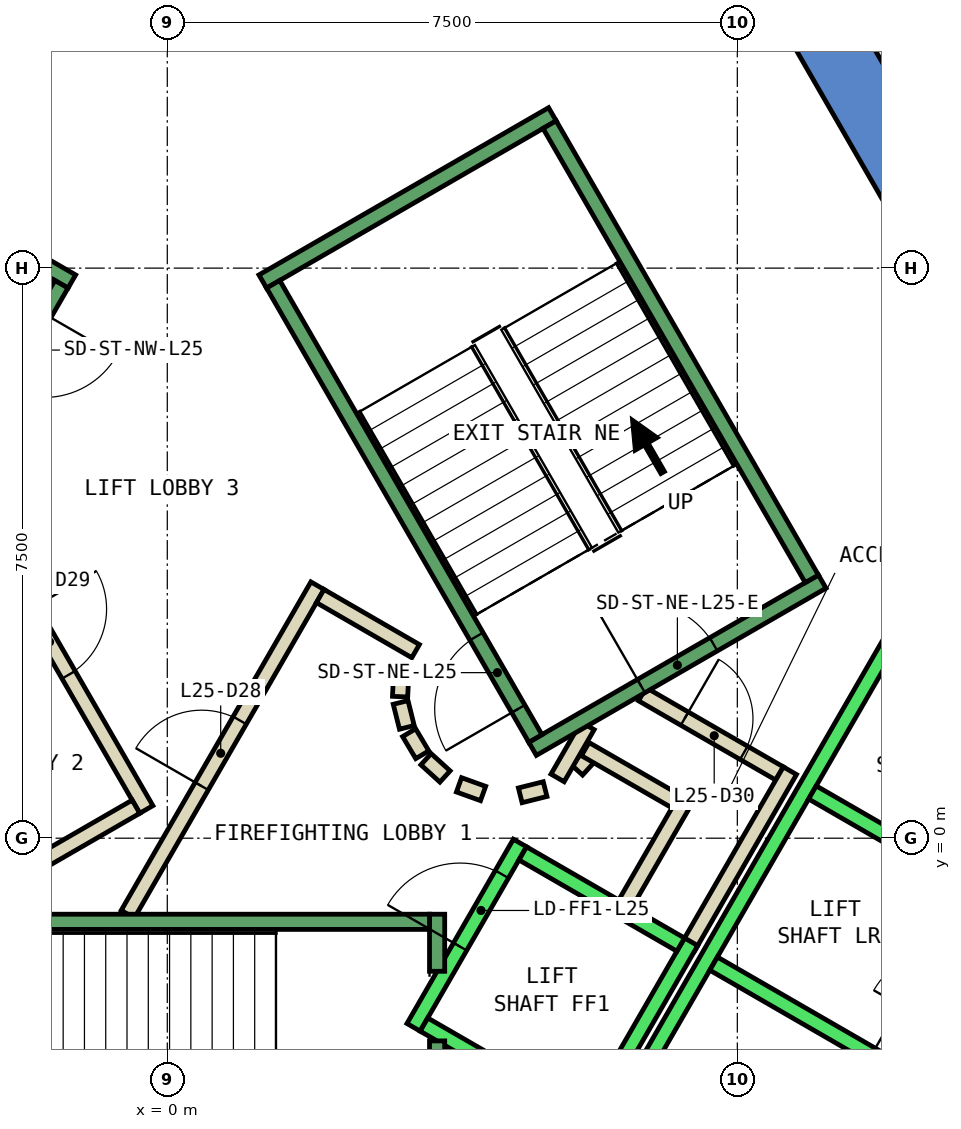
"""IFC4 building model, lengths in metres.
Left out: names, types, materials, properties, quantities, classifications, styles, units other than length and angle.
Written with IfcOpenShell. Run it as: python <this file> out.ifc"""

import sys

from ifc_helpers import new_model, si_unit, direction, frame, frame_2d, origin, place, context, subcontext, project, spatial, polyline, rectangle, outline, extrude, element, fill, save


model = new_model("IFC4")
c1 = context("Model", 3, precision=1e-05, world=origin(), true_north=direction((0.0, 1.0)))
c2 = subcontext(c1, "Body", "Model", "MODEL_VIEW")
j1 = project(units=[si_unit("LENGTHUNIT", "METRE"), si_unit("PLANEANGLEUNIT", "RADIAN")], contexts=[c1])
p1 = place(None, origin())
s1 = spatial("IfcSite", under=j1, at=p1, CompositionType="ELEMENT")
p2 = place(p1, origin())
s2 = spatial("IfcBuilding", under=s1, at=p2, CompositionType="ELEMENT")
p3 = place(p2, frame((0.0, 0.0, 116.0)))
s3 = spatial("IfcBuildingStorey", under=s2, at=p3, CompositionType="ELEMENT", Elevation=116.0)
p4 = place(p3, frame((0.0, 0.0, -0.4)))
e1 = element("IfcWall", 1, at=p4, inside=s3, PredefinedType="SHEAR", context=c2, shape_type="SweptSolid", body=[
    extrude(outline(polyline([(8.517, 11.748), (7.738, 11.298), (12.817, 2.5), (13.856, 2.5), (8.517, 11.748)])), origin(), (0.0, 0.0, 1.0), 4.2),
])
p5 = place(p3, frame((0.0, 0.0, -0.4)))
e2 = element("IfcWall", 2, at=p5, inside=s3, PredefinedType="SHEAR", context=c2, shape_type="SweptSolid", body=[
    extrude(outline(polyline([(10.717, -2.937), (9.938, -2.487), (9.288, -3.613), (10.067, -4.063), (10.717, -2.937)])), origin(), (0.0, 0.0, 1.0), 4.2),
])
p6 = place(p3, frame((5.39, 0.898, 0.0), z_axis=(0.0, 0.0, 1.0), x_axis=(0.673828488714, 0.738887791073, 0.0)))
e3 = element("IfcWall", 3, at=p6, inside=s3, PredefinedType="PARTITIONING", context=c2, shape_type="SweptSolid", body=[
    extrude(rectangle(XDim=0.263, YDim=0.2, at=frame_2d((0.131, 0.0))), origin(), (0.0, 0.0, 1.0), 3.8),
])
p7 = place(p3, frame((5.499, 1.172, 0.0), z_axis=(0.0, 0.0, 1.0), x_axis=(0.866333505267, -0.499465972466, 0.0)))
e4 = element("IfcWall", 4, at=p7, inside=s3, PredefinedType="PARTITIONING", context=c2, shape_type="SweptSolid", body=[
    extrude(rectangle(XDim=1.374, YDim=0.2, at=frame_2d((0.687, 0.0))), origin(), (0.0, 0.0, 1.0), 3.8),
])
p8 = place(p3, frame((6.826, 0.522, 0.0), z_axis=(0.0, 0.0, 1.0), x_axis=(-0.500016722714, -0.866015748706, 0.0)))
e5 = element("IfcWall", 5, at=p8, inside=s3, PredefinedType="PARTITIONING", context=c2, shape_type="SweptSolid", body=[
    extrude(rectangle(XDim=1.7, YDim=0.2, at=frame_2d((0.85, 0.0))), origin(), (0.0, 0.0, 1.0), 3.8),
])
p9 = place(p3, frame((6.25, 1.894, 0.0), z_axis=(0.0, 0.0, 1.0), x_axis=(0.866043184279, -0.499969202016, 0.0)))
e6 = element("IfcWall", 6, at=p9, inside=s3, PredefinedType="PARTITIONING", context=c2, shape_type="SweptSolid", body=[
    extrude(rectangle(XDim=2.084, YDim=0.2, at=frame_2d((1.042, 0.0))), origin(), (0.0, 0.0, 1.0), 3.8),
])
p10 = place(p9, frame((0.642, 0.0, 0.0)))
e7 = element("IfcOpeningElement", 7, at=p10, cuts=e6, PredefinedType="OPENING", context=c2, shape_type="SweptSolid", body=[
    extrude(rectangle(XDim=0.9, YDim=2.1, at=frame_2d((0.45, 1.05))), frame((0.0, 0.11, 0.0), z_axis=(0.0, -1.0, 0.0), x_axis=(1.0, 0.0, 0.0)), (0.0, 0.0, 1.0), 0.22),
])
p11 = place(p3, frame((8.192, 0.888, 0.0), z_axis=(0.0, 0.0, 1.0), x_axis=(-0.499940625693, -0.866059680843, 0.0)))
e8 = element("IfcWall", 8, at=p11, inside=s3, PredefinedType="PARTITIONING", context=c2, shape_type="SweptSolid", body=[
    extrude(rectangle(XDim=2.68, YDim=0.2, at=frame_2d((1.34, 0.0))), origin(), (0.0, 0.0, 1.0), 3.8),
])
p12 = place(p3, frame((5.135, 0.793, 0.0), z_axis=(0.0, 0.0, 1.0), x_axis=(0.499526442893, 0.866298639529, 0.0)))
e9 = element("IfcWall", 9, at=p12, inside=s3, PredefinedType="PARTITIONING", context=c2, shape_type="SweptSolid", body=[
    extrude(rectangle(XDim=0.791, YDim=0.2, at=frame_2d((0.396, 0.0))), origin(), (0.0, 0.0, 1.0), 3.8),
])
p13 = place(p3, frame((-0.52, -1.0, 0.0), z_axis=(0.0, 0.0, 1.0), x_axis=(0.50011622646, 0.865958290007, 0.0)))
e10 = element("IfcWall", 10, at=p13, inside=s3, PredefinedType="PARTITIONING", context=c2, shape_type="SweptSolid", body=[
    extrude(rectangle(XDim=4.991, YDim=0.2, at=frame_2d((2.496, 0.0))), origin(), (0.0, 0.0, 1.0), 3.8),
])
p14 = place(p13, frame((1.945, 0.0, 0.0)))
e11 = element("IfcOpeningElement", 11, at=p14, cuts=e10, PredefinedType="OPENING", context=c2, shape_type="SweptSolid", body=[
    extrude(rectangle(XDim=1.0, YDim=2.1, at=frame_2d((0.5, 1.05))), frame((0.0, 0.11, 0.0), z_axis=(0.0, -1.0, 0.0), x_axis=(1.0, 0.0, 0.0)), (0.0, 0.0, 1.0), 0.22),
])
p15 = place(p3, frame((2.012, 3.186, 0.0), z_axis=(0.0, 0.0, 1.0), x_axis=(0.865891012941, -0.500232699559, 0.0)))
e12 = element("IfcWall", 12, at=p15, inside=s3, PredefinedType="PARTITIONING", context=c2, shape_type="SweptSolid", body=[
    extrude(rectangle(XDim=1.449, YDim=0.2, at=frame_2d((0.725, 0.0))), origin(), (0.0, 0.0, 1.0), 3.8),
])
p16 = place(p3, frame((3.079, 2.199, 0.0), z_axis=(0.0, 0.0, 1.0), x_axis=(-0.047771483479, -0.998858290933, 0.0)))
e13 = element("IfcWall", 13, at=p16, inside=s3, PredefinedType="PARTITIONING", context=c2, shape_type="SweptSolid", body=[
    extrude(rectangle(XDim=0.337, YDim=0.2, at=frame_2d((0.169, 0.0))), origin(), (0.0, 0.0, 1.0), 3.8),
])
p17 = place(p3, frame((3.07, 1.786, 0.0), z_axis=(0.0, 0.0, 1.0), x_axis=(0.242705583207, -0.970099994784, 0.0)))
e14 = element("IfcWall", 14, at=p17, inside=s3, PredefinedType="PARTITIONING", context=c2, shape_type="SweptSolid", body=[
    extrude(rectangle(XDim=0.338, YDim=0.2, at=frame_2d((0.169, 0.0))), origin(), (0.0, 0.0, 1.0), 3.8),
])
for number, where, z_axis, x_axis in (
    (15, (3.182, 1.388, 0.0), (0.0, 0.0, 1.0), (0.512, -0.859, 0.0)),
    (16, (3.404, 1.039, 0.0), (0.0, 0.0, 1.0), (0.74, -0.672, 0.0)),
):
    element("IfcWall", number, at=place(p3, frame(where, z_axis=z_axis, x_axis=x_axis)), inside=s3, PredefinedType="PARTITIONING", context=c2, shape_type="SweptSolid", body=[
        extrude(rectangle(XDim=0.338, YDim=0.2, at=frame_2d((0.169, 0.0))), origin(), (0.0, 0.0, 1.0), 3.8),
    ])
p18 = place(p3, frame((3.838, 0.702, 0.0), z_axis=(0.0, 0.0, 1.0), x_axis=(0.941035081519, -0.338308993895, 0.0)))
e17 = element("IfcWall", 17, at=p18, inside=s3, PredefinedType="PARTITIONING", context=c2, shape_type="SweptSolid", body=[
    extrude(rectangle(XDim=0.337, YDim=0.2, at=frame_2d((0.168, 0.0))), origin(), (0.0, 0.0, 1.0), 3.8),
])
p19 = place(p3, frame((4.644, 0.564, 0.0), z_axis=(0.0, 0.0, 1.0), x_axis=(0.969929076366, 0.243387729394, 0.0)))
e18 = element("IfcWall", 18, at=p19, inside=s3, PredefinedType="PARTITIONING", context=c2, shape_type="SweptSolid", body=[
    extrude(rectangle(XDim=0.337, YDim=0.2, at=frame_2d((0.168, 0.0))), origin(), (0.0, 0.0, 1.0), 3.8),
])
p20 = place(p3, frame((-2.771, 4.7, 0.0), z_axis=(0.0, 0.0, 1.0), x_axis=(0.499969479948, -0.866043023828, 0.0)))
e19 = element("IfcWall", 19, at=p20, inside=s3, PredefinedType="PARTITIONING", context=c2, shape_type="SweptSolid", body=[
    extrude(rectangle(XDim=4.99, YDim=0.2, at=frame_2d((2.495, 0.0))), origin(), (0.0, 0.0, 1.0), 3.8),
])
p21 = place(p20, frame((1.945, 0.0, 0.0)))
e20 = element("IfcOpeningElement", 20, at=p21, cuts=e19, PredefinedType="OPENING", context=c2, shape_type="SweptSolid", body=[
    extrude(rectangle(XDim=1.0, YDim=2.1, at=frame_2d((0.5, 1.05))), frame((0.0, 0.11, 0.0), z_axis=(0.0, -1.0, 0.0), x_axis=(1.0, 0.0, 0.0)), (0.0, 0.0, 1.0), 0.22),
])
p22 = place(p3, frame((-0.412, 0.414, 0.0), z_axis=(0.0, 0.0, 1.0), x_axis=(-0.866017369001, -0.500013916395, 0.0)))
e21 = element("IfcWall", 21, at=p22, inside=s3, PredefinedType="PARTITIONING", context=c2, shape_type="SweptSolid", body=[
    extrude(rectangle(XDim=1.45, YDim=0.2, at=frame_2d((0.725, 0.0))), origin(), (0.0, 0.0, 1.0), 3.8),
])
p23 = place(p3, frame((3.24, -2.488, 0.0), z_axis=(0.0, 0.0, 1.0), x_axis=(0.49994636267, 0.866056369097, 0.0)))
e22 = element("IfcWall", 22, at=p23, inside=s3, PredefinedType="STANDARD", context=c2, shape_type="SweptSolid", body=[
    extrude(rectangle(XDim=2.8, YDim=0.2, at=frame_2d((1.4, 0.0))), origin(), (0.0, 0.0, 1.0), 3.8),
])
p24 = place(p23, frame((1.225, 0.0, 0.0)))
e23 = element("IfcOpeningElement", 23, at=p24, cuts=e22, PredefinedType="OPENING", context=c2, shape_type="SweptSolid", body=[
    extrude(rectangle(XDim=1.1, YDim=2.1, at=frame_2d((0.55, 1.05))), frame((0.0, 0.11, 0.0), z_axis=(0.0, -1.0, 0.0), x_axis=(1.0, 0.0, 0.0)), (0.0, 0.0, 1.0), 0.22),
])
p25 = place(p3, frame((5.492, -3.788, 0.0), z_axis=(0.0, 0.0, 1.0), x_axis=(0.500011755427, 0.866018616679, 0.0)))
e24 = element("IfcWall", 24, at=p25, inside=s3, PredefinedType="STANDARD", context=c2, shape_type="SweptSolid", body=[
    extrude(rectangle(XDim=2.8, YDim=0.2, at=frame_2d((1.4, 0.0))), origin(), (0.0, 0.0, 1.0), 3.8),
])
p26 = place(p3, frame((3.377, -2.452, 0.0), z_axis=(0.0, 0.0, 1.0), x_axis=(0.865955154139, -0.50012165622, 0.0)))
e25 = element("IfcWall", 25, at=p26, inside=s3, PredefinedType="STANDARD", context=c2, shape_type="SweptSolid", body=[
    extrude(rectangle(XDim=2.4, YDim=0.2, at=frame_2d((1.2, 0.0))), origin(), (0.0, 0.0, 1.0), 3.8),
])
p27 = place(p3, frame((4.677, -0.2, 0.0), z_axis=(0.0, 0.0, 1.0), x_axis=(0.865973769406, -0.500089422704, 0.0)))
e26 = element("IfcWall", 26, at=p27, inside=s3, PredefinedType="STANDARD", context=c2, shape_type="SweptSolid", body=[
    extrude(rectangle(XDim=2.399, YDim=0.2, at=frame_2d((1.2, 0.0))), origin(), (0.0, 0.0, 1.0), 3.8),
])
p28 = place(p3, frame((4.451, -6.19, 0.0), z_axis=(0.0, 0.0, 1.0), x_axis=(0.50000090737, 0.866024879913, 0.0)))
e27 = element("IfcWall", 27, at=p28, inside=s3, PredefinedType="STANDARD", context=c2, shape_type="SweptSolid", body=[
    extrude(rectangle(XDim=10.6, YDim=0.2, at=frame_2d((5.3, 0.0))), origin(), (0.0, 0.0, 1.0), 3.8),
])
for number, where, z_axis, x_axis in (
    (28, (7.188, -1.65, 0.0), (0.0, 0.0, 1.0), (0.866, -0.5, 0.0)),
    (29, (8.488, 0.602, 0.0), (0.0, 0.0, 1.0), (0.866, -0.5, 0.0)),
):
    element("IfcWall", number, at=place(p3, frame(where, z_axis=z_axis, x_axis=x_axis)), inside=s3, PredefinedType="STANDARD", context=c2, shape_type="SweptSolid", body=[
        extrude(rectangle(XDim=2.5, YDim=0.2, at=frame_2d((1.25, 0.0))), origin(), (0.0, 0.0, 1.0), 3.8),
    ])
p29 = place(p3, frame((3.55, -2.667, 0.0), z_axis=(0.0, 0.0, 1.0), x_axis=(0.0, -1.0, 0.0)))
e30 = element("IfcWall", 30, at=p29, inside=s3, PredefinedType="STANDARD", context=c2, shape_type="SweptSolid", body=[
    extrude(rectangle(XDim=2.733, YDim=0.2, at=frame_2d((1.366, 0.0))), origin(), (0.0, 0.0, 1.0), 3.8),
])
p30 = place(p3, frame((3.55, -1.0, 0.0), z_axis=(0.0, 0.0, 1.0), x_axis=(0.0, -1.0, 0.0)))
e31 = element("IfcWall", 31, at=p30, inside=s3, PredefinedType="STANDARD", context=c2, shape_type="SweptSolid", body=[
    extrude(rectangle(XDim=0.751, YDim=0.2, at=frame_2d((0.375, 0.0))), origin(), (0.0, 0.0, 1.0), 3.8),
])
p31 = place(p3, frame((-3.45, -1.1, 0.0), z_axis=(0.0, 0.0, 1.0), x_axis=(1.0, 0.0, 0.0)))
e32 = element("IfcWall", 32, at=p31, inside=s3, PredefinedType="STANDARD", context=c2, shape_type="SweptSolid", body=[
    extrude(rectangle(XDim=6.9, YDim=0.2, at=frame_2d((3.45, 0.0))), origin(), (0.0, 0.0, 1.0), 3.8),
])
p32 = place(p31, frame((0.45, 0.0, 0.0)))
e33 = element("IfcOpeningElement", 33, at=p32, cuts=e32, PredefinedType="OPENING", context=c2, shape_type="SweptSolid", body=[
    extrude(rectangle(XDim=1.1, YDim=2.2, at=frame_2d((0.55, 1.1))), frame((0.0, 0.11, 0.0), z_axis=(0.0, -1.0, 0.0), x_axis=(1.0, 0.0, 0.0)), (0.0, 0.0, 1.0), 0.22),
])
p33 = place(p3, frame((4.806, 1.176, 0.0), z_axis=(0.0, 0.0, 1.0), x_axis=(0.866059941101, 0.499940174841, 0.0)))
e34 = element("IfcWall", 34, at=p33, inside=s3, PredefinedType="STANDARD", context=c2, shape_type="SweptSolid", body=[
    extrude(rectangle(XDim=4.4, YDim=0.2, at=frame_2d((2.2, 0.0))), origin(), (0.0, 0.0, 1.0), 3.8),
])
p34 = place(p33, frame((1.65, 0.0, 0.0)))
e35 = element("IfcOpeningElement", 35, at=p34, cuts=e34, PredefinedType="OPENING", context=c2, shape_type="SweptSolid", body=[
    extrude(rectangle(XDim=1.1, YDim=2.2, at=frame_2d((0.55, 1.1))), frame((0.0, 0.11, 0.0), z_axis=(0.0, -1.0, 0.0), x_axis=(1.0, 0.0, 0.0)), (0.0, 0.0, 1.0), 0.22),
])
p35 = place(p3, frame((1.256, 7.324, 0.0), z_axis=(0.0, 0.0, 1.0), x_axis=(0.866046073146, 0.499964197906, 0.0)))
e36 = element("IfcWall", 36, at=p35, inside=s3, PredefinedType="STANDARD", context=c2, shape_type="SweptSolid", body=[
    extrude(rectangle(XDim=4.4, YDim=0.2, at=frame_2d((2.2, 0.0))), origin(), (0.0, 0.0, 1.0), 3.8),
])
p36 = place(p3, frame((4.843, 1.312, 0.0), z_axis=(0.0, 0.0, 1.0), x_axis=(-0.499963383562, 0.866046543262, 0.0)))
e37 = element("IfcWall", 37, at=p36, inside=s3, PredefinedType="STANDARD", context=c2, shape_type="SweptSolid", body=[
    extrude(rectangle(XDim=6.9, YDim=0.2, at=frame_2d((3.45, 0.0))), origin(), (0.0, 0.0, 1.0), 3.8),
])
p37 = place(p36, frame((0.45, 0.0, 0.0)))
e38 = element("IfcOpeningElement", 38, at=p37, cuts=e37, PredefinedType="OPENING", context=c2, shape_type="SweptSolid", body=[
    extrude(rectangle(XDim=1.1, YDim=2.2, at=frame_2d((0.55, 1.1))), frame((0.0, 0.11, 0.0), z_axis=(0.0, -1.0, 0.0), x_axis=(1.0, 0.0, 0.0)), (0.0, 0.0, 1.0), 0.22),
])
p38 = place(p3, frame((8.48, 3.412, 0.0), z_axis=(0.0, 0.0, 1.0), x_axis=(-0.499978703459, 0.866037698999, 0.0)))
e39 = element("IfcWall", 39, at=p38, inside=s3, PredefinedType="STANDARD", context=c2, shape_type="SweptSolid", body=[
    extrude(rectangle(XDim=6.9, YDim=0.2, at=frame_2d((3.45, 0.0))), origin(), (0.0, 0.0, 1.0), 3.8),
])
p39 = place(p3, frame((-1.256, 7.324, 0.0), z_axis=(0.0, 0.0, 1.0), x_axis=(-0.866046073146, 0.499964197906, 0.0)))
e40 = element("IfcWall", 40, at=p39, inside=s3, PredefinedType="STANDARD", context=c2, shape_type="SweptSolid", body=[
    extrude(rectangle(XDim=4.4, YDim=0.2, at=frame_2d((2.2, 0.0))), origin(), (0.0, 0.0, 1.0), 3.8),
])
p40 = place(p39, frame((1.65, 0.0, 0.0)))
e41 = element("IfcOpeningElement", 41, at=p40, cuts=e40, PredefinedType="OPENING", context=c2, shape_type="SweptSolid", body=[
    extrude(rectangle(XDim=1.1, YDim=2.2, at=frame_2d((0.55, 1.1))), frame((0.0, 0.11, 0.0), z_axis=(0.0, -1.0, 0.0), x_axis=(1.0, 0.0, 0.0)), (0.0, 0.0, 1.0), 0.22),
])
p41 = place(p3, frame((-1.393, 7.288, 0.0), z_axis=(0.0, 0.0, 1.0), x_axis=(-0.499963383562, -0.866046543262, 0.0)))
e42 = element("IfcWall", 42, at=p41, inside=s3, PredefinedType="STANDARD", context=c2, shape_type="SweptSolid", body=[
    extrude(rectangle(XDim=6.9, YDim=0.2, at=frame_2d((3.45, 0.0))), origin(), (0.0, 0.0, 1.0), 3.8),
])
p42 = place(p41, frame((0.45, 0.0, 0.0)))
e43 = element("IfcOpeningElement", 43, at=p42, cuts=e42, PredefinedType="OPENING", context=c2, shape_type="SweptSolid", body=[
    extrude(rectangle(XDim=1.1, YDim=2.2, at=frame_2d((0.55, 1.1))), frame((0.0, 0.11, 0.0), z_axis=(0.0, -1.0, 0.0), x_axis=(1.0, 0.0, 0.0)), (0.0, 0.0, 1.0), 0.22),
])
p43 = place(p14, origin())
e44 = element("IfcDoor", 44, at=p43, inside=s3, OperationType="SINGLE_SWING_LEFT", PredefinedType="DOOR", context=c2, shape_type="SweptSolid", body=[
    extrude(rectangle(XDim=1.0, YDim=2.1, at=frame_2d((0.5, 1.05))), frame((0.0, 0.025, 0.0), z_axis=(0.0, -1.0, 0.0), x_axis=(1.0, 0.0, 0.0)), (0.0, 0.0, 1.0), 0.05),
])
fill(e11, e44)
p44 = place(p21, origin())
e45 = element("IfcDoor", 45, at=p44, inside=s3, OperationType="SINGLE_SWING_RIGHT", PredefinedType="DOOR", context=c2, shape_type="SweptSolid", body=[
    extrude(rectangle(XDim=1.0, YDim=2.1, at=frame_2d((0.5, 1.05))), frame((0.0, 0.025, 0.0), z_axis=(0.0, -1.0, 0.0), x_axis=(1.0, 0.0, 0.0)), (0.0, 0.0, 1.0), 0.05),
])
fill(e20, e45)
p45 = place(p10, origin())
e46 = element("IfcDoor", 46, at=p45, inside=s3, OperationType="SINGLE_SWING_LEFT", PredefinedType="DOOR", context=c2, shape_type="SweptSolid", body=[
    extrude(rectangle(XDim=0.9, YDim=2.1, at=frame_2d((0.45, 1.05))), frame((0.0, 0.025, 0.0), z_axis=(0.0, -1.0, 0.0), x_axis=(1.0, 0.0, 0.0)), (0.0, 0.0, 1.0), 0.05),
])
fill(e7, e46)
p46 = place(p24, origin())
e47 = element("IfcDoor", 47, at=p46, inside=s3, OperationType="SLIDING_TO_LEFT", PredefinedType="DOOR", context=c2, shape_type="SweptSolid", body=[
    extrude(rectangle(XDim=1.1, YDim=2.1, at=frame_2d((0.55, 1.05))), frame((0.0, 0.025, 0.0), z_axis=(0.0, -1.0, 0.0), x_axis=(1.0, 0.0, 0.0)), (0.0, 0.0, 1.0), 0.05),
])
fill(e23, e47)
p47 = place(p37, origin())
e48 = element("IfcDoor", 48, at=p47, inside=s3, OperationType="SINGLE_SWING_LEFT", PredefinedType="DOOR", context=c2, shape_type="SweptSolid", body=[
    extrude(rectangle(XDim=1.1, YDim=2.2, at=frame_2d((0.55, 1.1))), frame((0.0, 0.025, 0.0), z_axis=(0.0, -1.0, 0.0), x_axis=(1.0, 0.0, 0.0)), (0.0, 0.0, 1.0), 0.05),
])
fill(e38, e48)
p48 = place(p34, origin())
e49 = element("IfcDoor", 49, at=p48, inside=s3, OperationType="SINGLE_SWING_LEFT", PredefinedType="DOOR", context=c2, shape_type="SweptSolid", body=[
    extrude(rectangle(XDim=1.1, YDim=2.2, at=frame_2d((0.55, 1.1))), frame((0.0, 0.025, 0.0), z_axis=(0.0, -1.0, 0.0), x_axis=(1.0, 0.0, 0.0)), (0.0, 0.0, 1.0), 0.05),
])
fill(e35, e49)
save(model, sys.argv[1])
